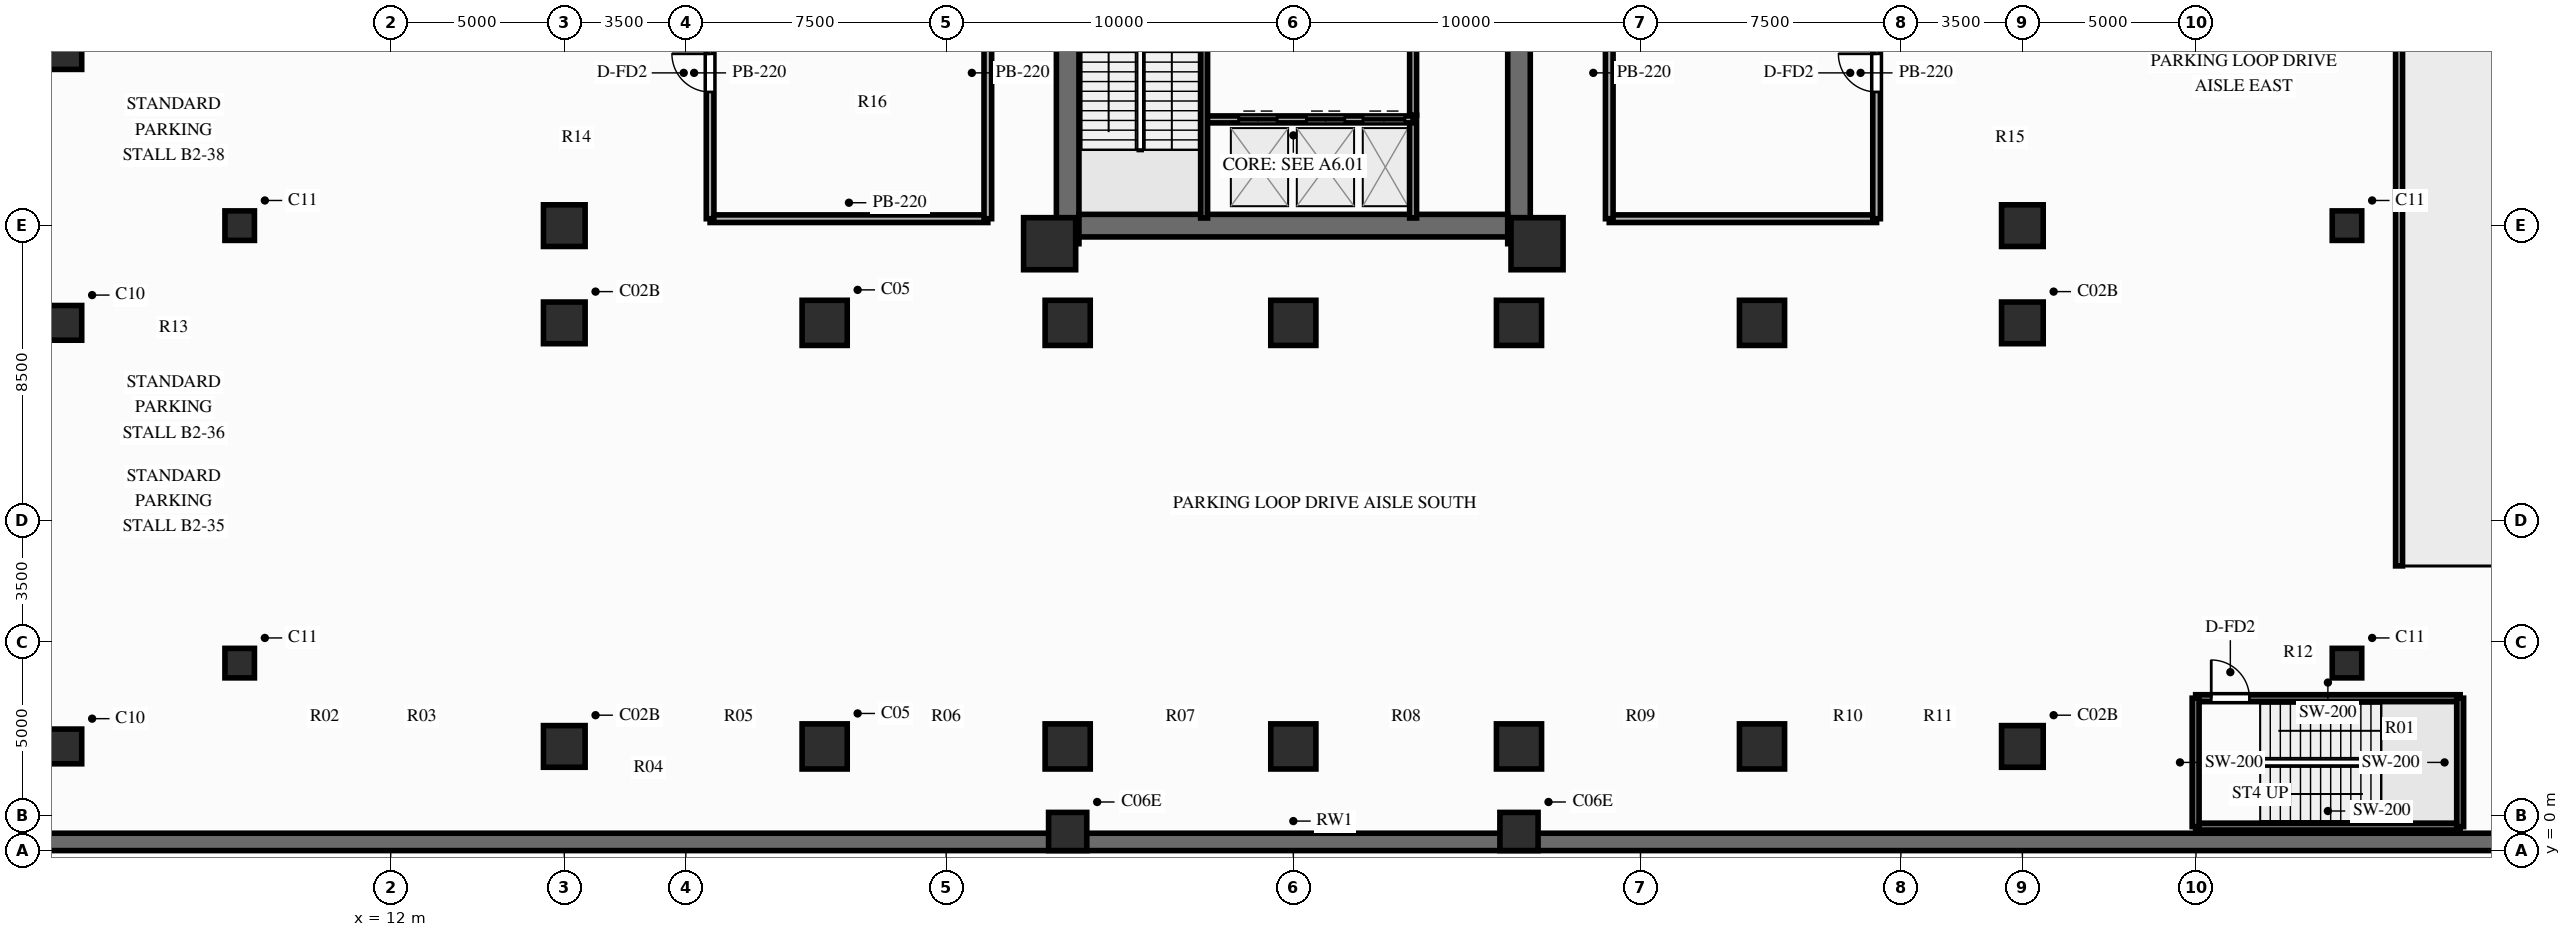
"""IFC4 building model, lengths in metres.
Left out: names, types, materials, properties, quantities, classifications, styles, units other than length and angle.
Written with IfcOpenShell. Run it as: python <this file> out.ifc"""

import sys

from ifc_helpers import new_model, si_unit, direction, frame, frame_2d, origin, origin_2d, place, context, subcontext, project, spatial, rectangle, circle, extrude, source, transform, mapped, element, fill, save


model = new_model("IFC4")
c1 = context("Model", 3, precision=1e-05, world=origin(), true_north=direction((0.0, 1.0)))
c2 = subcontext(c1, "Body", "Model", "MODEL_VIEW")
j1 = project(units=[si_unit("LENGTHUNIT", "METRE"), si_unit("PLANEANGLEUNIT", "RADIAN")], contexts=[c1])
p1 = place(None, origin())
s1 = spatial("IfcSite", under=j1, at=p1, CompositionType="ELEMENT")
p2 = place(p1, origin())
s2 = spatial("IfcBuilding", under=s1, at=p2, CompositionType="ELEMENT")
p3 = place(p2, frame((0.0, 0.0, -9.2)))
s3 = spatial("IfcBuildingStorey", under=s2, at=p3, CompositionType="ELEMENT", Elevation=-9.2)
p4 = place(p3, frame((0.25, 0.25, 0.0), z_axis=(0.0, 0.0, 1.0), x_axis=(1.0, 0.0, 0.0)))
e1 = element("IfcWall", 1, at=p4, inside=s3, PredefinedType="USERDEFINED", context=c2, shape_type="SweptSolid", body=[
    extrude(rectangle(XDim=75.5, YDim=0.5, at=frame_2d((37.75, 0.0))), origin(), (0.0, 0.0, 1.0), 4.6),
])
p5 = place(p3, frame((31.5, 17.48, 0.0), z_axis=(0.0, 0.0, 1.0), x_axis=(0.0, 1.0, 0.0)))
e2 = element("IfcWall", 2, at=p5, inside=s3, PredefinedType="SHEAR", context=c2, shape_type="SweptSolid", body=[
    extrude(rectangle(XDim=19.04, YDim=0.65, at=frame_2d((9.52, 0.0))), origin(), (0.0, 0.0, 1.0), 4.6),
])
p6 = place(p5, frame((6.32, 0.0, 0.0)))
e3 = element("IfcOpeningElement", 3, at=p6, cuts=e2, PredefinedType="OPENING", context=c2, shape_type="SweptSolid", body=[
    extrude(rectangle(XDim=1.1, YDim=2.15, at=frame_2d((0.55, 1.075))), frame((0.0, 0.337, 0.0), z_axis=(0.0, -1.0, 0.0), x_axis=(1.0, 0.0, 0.0)), (0.0, 0.0, 1.0), 0.674),
])
p7 = place(p3, frame((44.5, 17.48, 0.0), z_axis=(0.0, 0.0, 1.0), x_axis=(0.0, 1.0, 0.0)))
e4 = element("IfcWall", 4, at=p7, inside=s3, PredefinedType="SHEAR", context=c2, shape_type="SweptSolid", body=[
    extrude(rectangle(XDim=19.04, YDim=0.65, at=frame_2d((9.52, 0.0))), origin(), (0.0, 0.0, 1.0), 4.6),
])
p8 = place(p7, frame((12.67, 0.0, 0.0), z_axis=(0.0, 0.0, 1.0), x_axis=(-1.0, 0.0, 0.0)))
e5 = element("IfcOpeningElement", 5, at=p8, cuts=e4, PredefinedType="OPENING", context=c2, shape_type="SweptSolid", body=[
    extrude(rectangle(XDim=1.1, YDim=2.15, at=frame_2d((0.55, 1.075))), frame((0.0, 0.337, 0.0), z_axis=(0.0, -1.0, 0.0), x_axis=(1.0, 0.0, 0.0)), (0.0, 0.0, 1.0), 0.674),
])
p9 = place(p3, frame((31.825, 18.0, 0.0), z_axis=(0.0, 0.0, 1.0), x_axis=(1.0, 0.0, 0.0)))
e6 = element("IfcWall", 6, at=p9, inside=s3, PredefinedType="SHEAR", context=c2, shape_type="SweptSolid", body=[
    extrude(rectangle(XDim=12.35, YDim=0.65, at=frame_2d((6.175, 0.0))), origin(), (0.0, 0.0, 1.0), 4.6),
])
m1 = source(origin(), c2, "Body", "SweptSolid", [
    extrude(rectangle(XDim=1.5, YDim=1.5, at=origin_2d()), origin(), (0.0, 0.0, 1.0), 4.6),
])
for number, where, z_axis, x_axis in (
    (7, (30.98, 17.48, 0.0), (0.0, 0.0, 1.0), (1.0, 0.0, 0.0)),
    (8, (45.02, 17.48, 0.0), (0.0, 0.0, 1.0), (1.0, 0.0, 0.0)),
):
    element("IfcColumn", number, at=place(p3, frame(where, z_axis=z_axis, x_axis=x_axis)), inside=s3, PredefinedType="COLUMN", context=c2, shape_type="MappedRepresentation", body=[
        mapped(m1, transform((0.0, 0.0, 0.0), scale=1.0)),
    ])
m2 = source(origin(), c2, "Body", "SweptSolid", [
    extrude(circle(Radius=0.5, at=origin_2d()), origin(), (0.0, 0.0, 1.0), 4.6),
])
for number, where, z_axis, x_axis in (
    (9, (2.6, 3.0, 0.0), (0.0, 0.0, 1.0), (1.0, 0.0, 0.0)),
    (10, (2.6, 15.2, 0.0), (0.0, 0.0, 1.0), (1.0, 0.0, 0.0)),
    (11, (2.6, 23.0, 0.0), (0.0, 0.0, 1.0), (1.0, 0.0, 0.0)),
):
    element("IfcColumn", number, at=place(p3, frame(where, z_axis=z_axis, x_axis=x_axis)), inside=s3, PredefinedType="COLUMN", context=c2, shape_type="MappedRepresentation", body=[
        mapped(m2, transform((0.0, 0.0, 0.0), scale=1.0)),
    ])
m3 = source(origin(), c2, "Body", "SweptSolid", [
    extrude(circle(Radius=0.425, at=origin_2d()), origin(), (0.0, 0.0, 1.0), 4.6),
])
for number, where, z_axis, x_axis in (
    (12, (7.65, 5.4, 0.0), (0.0, 0.0, 1.0), (1.0, 0.0, 0.0)),
    (13, (68.35, 5.4, 0.0), (0.0, 0.0, 1.0), (1.0, 0.0, 0.0)),
    (14, (7.65, 18.0, 0.0), (0.0, 0.0, 1.0), (1.0, 0.0, 0.0)),
    (15, (68.35, 18.0, 0.0), (0.0, 0.0, 1.0), (1.0, 0.0, 0.0)),
):
    element("IfcColumn", number, at=place(p3, frame(where, z_axis=z_axis, x_axis=x_axis)), inside=s3, PredefinedType="COLUMN", context=c2, shape_type="MappedRepresentation", body=[
        mapped(m3, transform((0.0, 0.0, 0.0), scale=1.0)),
    ])
m4 = source(origin(), c2, "Body", "SweptSolid", [
    extrude(rectangle(XDim=1.2, YDim=1.2, at=origin_2d()), origin(), (0.0, 0.0, 1.0), 4.6),
])
for number, where, z_axis, x_axis in (
    (16, (17.0, 3.0, 0.0), (0.0, 0.0, 1.0), (1.0, 0.0, 0.0)),
    (17, (59.0, 3.0, 0.0), (0.0, 0.0, 1.0), (1.0, 0.0, 0.0)),
    (18, (17.0, 15.2, 0.0), (0.0, 0.0, 1.0), (1.0, 0.0, 0.0)),
    (19, (59.0, 15.2, 0.0), (0.0, 0.0, 1.0), (1.0, 0.0, 0.0)),
    (20, (17.0, 18.0, 0.0), (0.0, 0.0, 1.0), (1.0, 0.0, 0.0)),
    (21, (59.0, 18.0, 0.0), (0.0, 0.0, 1.0), (1.0, 0.0, 0.0)),
):
    element("IfcColumn", number, at=place(p3, frame(where, z_axis=z_axis, x_axis=x_axis)), inside=s3, PredefinedType="COLUMN", context=c2, shape_type="MappedRepresentation", body=[
        mapped(m4, transform((0.0, 0.0, 0.0), scale=1.0)),
    ])
m5 = source(origin(), c2, "Body", "SweptSolid", [
    extrude(rectangle(XDim=1.3, YDim=1.3, at=origin_2d()), origin(), (0.0, 0.0, 1.0), 4.6),
])
for number, where, z_axis, x_axis in (
    (22, (24.5, 3.0, 0.0), (0.0, 0.0, 1.0), (1.0, 0.0, 0.0)),
    (23, (24.5, 15.2, 0.0), (0.0, 0.0, 1.0), (1.0, 0.0, 0.0)),
):
    element("IfcColumn", number, at=place(p3, frame(where, z_axis=z_axis, x_axis=x_axis)), inside=s3, PredefinedType="COLUMN", context=c2, shape_type="MappedRepresentation", body=[
        mapped(m5, transform((0.0, 0.0, 0.0), scale=1.0)),
    ])
m6 = source(origin(), c2, "Body", "SweptSolid", [
    extrude(rectangle(XDim=1.1, YDim=1.1, at=origin_2d()), origin(), (0.0, 0.0, 1.0), 4.6),
])
p10 = place(p3, frame((31.5, 0.55, 0.0), z_axis=(0.0, 0.0, 1.0), x_axis=(1.0, 0.0, 0.0)))
e24 = element("IfcColumn", 24, at=p10, inside=s3, PredefinedType="COLUMN", context=c2, shape_type="MappedRepresentation", body=[
    mapped(m6, transform((0.0, 0.0, 0.0), scale=1.0)),
])
for number, where, z_axis, x_axis in (
    (25, (31.5, 3.0, 0.0), (0.0, 0.0, 1.0), (1.0, 0.0, 0.0)),
    (26, (31.5, 15.2, 0.0), (0.0, 0.0, 1.0), (1.0, 0.0, 0.0)),
    (27, (38.0, 3.0, 0.0), (0.0, 0.0, 1.0), (1.0, 0.0, 0.0)),
    (28, (38.0, 15.2, 0.0), (0.0, 0.0, 1.0), (1.0, 0.0, 0.0)),
):
    element("IfcColumn", number, at=place(p3, frame(where, z_axis=z_axis, x_axis=x_axis)), inside=s3, PredefinedType="COLUMN", context=c2, shape_type="MappedRepresentation", body=[
        mapped(m5, transform((0.0, 0.0, 0.0), scale=1.0)),
    ])
p11 = place(p3, frame((44.5, 0.55, 0.0), z_axis=(0.0, 0.0, 1.0), x_axis=(1.0, 0.0, 0.0)))
e29 = element("IfcColumn", 29, at=p11, inside=s3, PredefinedType="COLUMN", context=c2, shape_type="MappedRepresentation", body=[
    mapped(m6, transform((0.0, 0.0, 0.0), scale=1.0)),
])
for number, where, z_axis, x_axis in (
    (30, (44.5, 3.0, 0.0), (0.0, 0.0, 1.0), (1.0, 0.0, 0.0)),
    (31, (44.5, 15.2, 0.0), (0.0, 0.0, 1.0), (1.0, 0.0, 0.0)),
    (32, (51.5, 3.0, 0.0), (0.0, 0.0, 1.0), (1.0, 0.0, 0.0)),
    (33, (51.5, 15.2, 0.0), (0.0, 0.0, 1.0), (1.0, 0.0, 0.0)),
):
    element("IfcColumn", number, at=place(p3, frame(where, z_axis=z_axis, x_axis=x_axis)), inside=s3, PredefinedType="COLUMN", context=c2, shape_type="MappedRepresentation", body=[
        mapped(m5, transform((0.0, 0.0, 0.0), scale=1.0)),
    ])
p12 = place(p3, frame((41.45, 18.22, 0.0), z_axis=(0.0, 0.0, 1.0), x_axis=(0.0, 1.0, 0.0)))
e34 = element("IfcWall", 34, at=p12, inside=s3, PredefinedType="PARTITIONING", context=c2, shape_type="SweptSolid", body=[
    extrude(rectangle(XDim=2.96, YDim=0.2, at=frame_2d((1.48, 0.0))), origin(), (0.0, 0.0, 1.0), 4.3),
])
p13 = place(p3, frame((41.45, 21.18, 0.0), z_axis=(0.0, 0.0, 1.0), x_axis=(0.0, 1.0, 0.0)))
e35 = element("IfcWall", 35, at=p13, inside=s3, PredefinedType="PARTITIONING", context=c2, shape_type="SweptSolid", body=[
    extrude(rectangle(XDim=7.42, YDim=0.2, at=frame_2d((3.71, 0.0))), origin(), (0.0, 0.0, 1.0), 4.3),
])
p14 = place(p13, frame((2.6, 0.0, 0.0)))
e36 = element("IfcOpeningElement", 36, at=p14, cuts=e35, PredefinedType="OPENING", context=c2, shape_type="SweptSolid", body=[
    extrude(rectangle(XDim=0.9, YDim=2.1, at=frame_2d((0.45, 1.05))), frame((0.0, 0.112, 0.0), z_axis=(0.0, -1.0, 0.0), x_axis=(1.0, 0.0, 0.0)), (0.0, 0.0, 1.0), 0.224),
])
p15 = place(p3, frame((35.43, 21.06, 0.0), z_axis=(0.0, 0.0, 1.0), x_axis=(1.0, 0.0, 0.0)))
e37 = element("IfcWall", 37, at=p15, inside=s3, PredefinedType="PARTITIONING", context=c2, shape_type="SweptSolid", body=[
    extrude(rectangle(XDim=6.02, YDim=0.2, at=frame_2d((3.01, 0.0))), origin(), (0.0, 0.0, 1.0), 4.3),
])
p16 = place(p15, frame((1.0, 0.0, 0.0)))
e38 = element("IfcOpeningElement", 38, at=p16, cuts=e37, PredefinedType="OPENING", context=c2, shape_type="SweptSolid", body=[
    extrude(rectangle(XDim=1.1, YDim=2.15, at=frame_2d((0.55, 1.075))), frame((0.0, 0.112, 0.0), z_axis=(0.0, -1.0, 0.0), x_axis=(1.0, 0.0, 0.0)), (0.0, 0.0, 1.0), 0.224),
])
p17 = place(p15, frame((2.95, 0.0, 0.0)))
e39 = element("IfcOpeningElement", 39, at=p17, cuts=e37, PredefinedType="OPENING", context=c2, shape_type="SweptSolid", body=[
    extrude(rectangle(XDim=1.1, YDim=2.15, at=frame_2d((0.55, 1.075))), frame((0.0, 0.112, 0.0), z_axis=(0.0, -1.0, 0.0), x_axis=(1.0, 0.0, 0.0)), (0.0, 0.0, 1.0), 0.224),
])
p18 = place(p15, frame((4.58, 0.0, 0.0)))
e40 = element("IfcOpeningElement", 40, at=p18, cuts=e37, PredefinedType="OPENING", context=c2, shape_type="SweptSolid", body=[
    extrude(rectangle(XDim=1.2, YDim=2.15, at=frame_2d((0.6, 1.075))), frame((0.0, 0.112, 0.0), z_axis=(0.0, -1.0, 0.0), x_axis=(1.0, 0.0, 0.0)), (0.0, 0.0, 1.0), 0.224),
])
p19 = place(p3, frame((35.43, 18.22, 0.0), z_axis=(0.0, 0.0, 1.0), x_axis=(0.0, 1.0, 0.0)))
e41 = element("IfcWall", 41, at=p19, inside=s3, PredefinedType="SOLIDWALL", context=c2, shape_type="SweptSolid", body=[
    extrude(rectangle(XDim=7.22, YDim=0.2, at=frame_2d((3.61, 0.0))), origin(), (0.0, 0.0, 1.0), 4.3),
])
p20 = place(p19, frame((6.68, 0.0, 0.0), z_axis=(0.0, 0.0, 1.0), x_axis=(-1.0, 0.0, 0.0)))
e42 = element("IfcOpeningElement", 42, at=p20, cuts=e41, PredefinedType="OPENING", context=c2, shape_type="SweptSolid", body=[
    extrude(rectangle(XDim=1.1, YDim=2.15, at=frame_2d((0.55, 1.075))), frame((0.0, 0.112, 0.0), z_axis=(0.0, -1.0, 0.0), x_axis=(1.0, 0.0, 0.0)), (0.0, 0.0, 1.0), 0.224),
])
p21 = place(p3, frame((63.99, 0.69, 0.0), z_axis=(0.0, 0.0, 1.0), x_axis=(1.0, 0.0, 0.0)))
e43 = element("IfcWall", 43, at=p21, inside=s3, PredefinedType="SOLIDWALL", context=c2, shape_type="SweptSolid", body=[
    extrude(rectangle(XDim=7.62, YDim=0.2, at=frame_2d((3.81, 0.0))), origin(), (0.0, 0.0, 1.0), 4.3),
])
p22 = place(p3, frame((63.99, 4.39, 0.0), z_axis=(0.0, 0.0, 1.0), x_axis=(1.0, 0.0, 0.0)))
e44 = element("IfcWall", 44, at=p22, inside=s3, PredefinedType="SOLIDWALL", context=c2, shape_type="SweptSolid", body=[
    extrude(rectangle(XDim=7.62, YDim=0.2, at=frame_2d((3.81, 0.0))), origin(), (0.0, 0.0, 1.0), 4.3),
])
p23 = place(p22, frame((0.45, 0.0, 0.0)))
e45 = element("IfcOpeningElement", 45, at=p23, cuts=e44, PredefinedType="OPENING", context=c2, shape_type="SweptSolid", body=[
    extrude(rectangle(XDim=1.1, YDim=2.15, at=frame_2d((0.55, 1.075))), frame((0.0, 0.112, 0.0), z_axis=(0.0, -1.0, 0.0), x_axis=(1.0, 0.0, 0.0)), (0.0, 0.0, 1.0), 0.224),
])
for number, where, z_axis, x_axis in (
    (46, (63.99, 0.69, 0.0), (0.0, 0.0, 1.0), (0.0, 1.0, 0.0)),
    (47, (71.61, 0.69, 0.0), (0.0, 0.0, 1.0), (0.0, 1.0, 0.0)),
):
    element("IfcWall", number, at=place(p3, frame(where, z_axis=z_axis, x_axis=x_axis)), inside=s3, PredefinedType="SOLIDWALL", context=c2, shape_type="SweptSolid", body=[
        extrude(rectangle(XDim=3.7, YDim=0.2, at=frame_2d((1.85, 0.0))), origin(), (0.0, 0.0, 1.0), 4.3),
    ])
p24 = place(p3, frame((69.85, 8.2, 0.0), z_axis=(0.0, 0.0, 1.0), x_axis=(0.0, 1.0, 0.0)))
e48 = element("IfcWall", 48, at=p24, inside=s3, PredefinedType="PARTITIONING", context=c2, shape_type="SweptSolid", body=[
    extrude(rectangle(XDim=31.6, YDim=0.2, at=frame_2d((15.8, 0.0))), origin(), (0.0, 0.0, 1.0), 4.3),
])
p25 = place(p3, frame((21.2, 18.2, 0.0), z_axis=(0.0, 0.0, 1.0), x_axis=(1.0, 0.0, 0.0)))
e49 = element("IfcWall", 49, at=p25, inside=s3, PredefinedType="PARTITIONING", context=c2, shape_type="SweptSolid", body=[
    extrude(rectangle(XDim=8.0, YDim=0.22, at=frame_2d((4.0, 0.0))), origin(), (0.0, 0.0, 1.0), 4.3),
])
p26 = place(p3, frame((21.2, 18.2, 0.0), z_axis=(0.0, 0.0, 1.0), x_axis=(0.0, 1.0, 0.0)))
e50 = element("IfcWall", 50, at=p26, inside=s3, PredefinedType="PARTITIONING", context=c2, shape_type="SweptSolid", body=[
    extrude(rectangle(XDim=8.4, YDim=0.22, at=frame_2d((4.2, 0.0))), origin(), (0.0, 0.0, 1.0), 4.3),
])
p27 = place(p26, frame((3.65, 0.0, 0.0)))
e51 = element("IfcOpeningElement", 51, at=p27, cuts=e50, PredefinedType="OPENING", context=c2, shape_type="SweptSolid", body=[
    extrude(rectangle(XDim=1.1, YDim=2.15, at=frame_2d((0.55, 1.075))), frame((0.0, 0.122, 0.0), z_axis=(0.0, -1.0, 0.0), x_axis=(1.0, 0.0, 0.0)), (0.0, 0.0, 1.0), 0.244),
])
p28 = place(p3, frame((29.2, 18.2, 0.0), z_axis=(0.0, 0.0, 1.0), x_axis=(0.0, 1.0, 0.0)))
e52 = element("IfcWall", 52, at=p28, inside=s3, PredefinedType="PARTITIONING", context=c2, shape_type="SweptSolid", body=[
    extrude(rectangle(XDim=8.4, YDim=0.22, at=frame_2d((4.2, 0.0))), origin(), (0.0, 0.0, 1.0), 4.3),
])
p29 = place(p3, frame((47.1, 18.2, 0.0), z_axis=(0.0, 0.0, 1.0), x_axis=(1.0, 0.0, 0.0)))
e53 = element("IfcWall", 53, at=p29, inside=s3, PredefinedType="PARTITIONING", context=c2, shape_type="SweptSolid", body=[
    extrude(rectangle(XDim=7.7, YDim=0.22, at=frame_2d((3.85, 0.0))), origin(), (0.0, 0.0, 1.0), 4.3),
])
p30 = place(p3, frame((47.1, 18.2, 0.0), z_axis=(0.0, 0.0, 1.0), x_axis=(0.0, 1.0, 0.0)))
e54 = element("IfcWall", 54, at=p30, inside=s3, PredefinedType="PARTITIONING", context=c2, shape_type="SweptSolid", body=[
    extrude(rectangle(XDim=8.4, YDim=0.22, at=frame_2d((4.2, 0.0))), origin(), (0.0, 0.0, 1.0), 4.3),
])
p31 = place(p3, frame((54.8, 18.2, 0.0), z_axis=(0.0, 0.0, 1.0), x_axis=(0.0, 1.0, 0.0)))
e55 = element("IfcWall", 55, at=p31, inside=s3, PredefinedType="PARTITIONING", context=c2, shape_type="SweptSolid", body=[
    extrude(rectangle(XDim=8.4, YDim=0.22, at=frame_2d((4.2, 0.0))), origin(), (0.0, 0.0, 1.0), 4.3),
])
p32 = place(p31, frame((3.65, 0.0, 0.0)))
e56 = element("IfcOpeningElement", 56, at=p32, cuts=e55, PredefinedType="OPENING", context=c2, shape_type="SweptSolid", body=[
    extrude(rectangle(XDim=1.1, YDim=2.15, at=frame_2d((0.55, 1.075))), frame((0.0, 0.122, 0.0), z_axis=(0.0, -1.0, 0.0), x_axis=(1.0, 0.0, 0.0)), (0.0, 0.0, 1.0), 0.244),
])
m7 = source(origin(), c2, "Body", "SweptSolid", [
    extrude(rectangle(XDim=1.1, YDim=2.15, at=frame_2d((0.55, 1.075))), frame((0.0, 0.025, 0.0), z_axis=(0.0, -1.0, 0.0), x_axis=(1.0, 0.0, 0.0)), (0.0, 0.0, 1.0), 0.05),
])
p33 = place(p16, origin())
e57 = element("IfcDoor", 57, at=p33, inside=s3, OperationType="DOUBLE_DOOR_SLIDING", PredefinedType="DOOR", context=c2, shape_type="MappedRepresentation", body=[
    mapped(m7, transform((0.0, 0.0, 0.0), scale=1.0)),
])
fill(e38, e57)
p34 = place(p17, origin())
e58 = element("IfcDoor", 58, at=p34, inside=s3, OperationType="DOUBLE_DOOR_SLIDING", PredefinedType="DOOR", context=c2, shape_type="MappedRepresentation", body=[
    mapped(m7, transform((0.0, 0.0, 0.0), scale=1.0)),
])
fill(e39, e58)
m8 = source(origin(), c2, "Body", "SweptSolid", [
    extrude(rectangle(XDim=1.2, YDim=2.15, at=frame_2d((0.6, 1.075))), frame((0.0, 0.025, 0.0), z_axis=(0.0, -1.0, 0.0), x_axis=(1.0, 0.0, 0.0)), (0.0, 0.0, 1.0), 0.05),
])
p35 = place(p18, origin())
e59 = element("IfcDoor", 59, at=p35, inside=s3, OperationType="DOUBLE_DOOR_SLIDING", PredefinedType="DOOR", context=c2, shape_type="MappedRepresentation", body=[
    mapped(m8, transform((0.0, 0.0, 0.0), scale=1.0)),
])
fill(e40, e59)
p36 = place(p23, origin())
e60 = element("IfcDoor", 60, at=p36, inside=s3, OperationType="SINGLE_SWING_LEFT", PredefinedType="DOOR", context=c2, shape_type="MappedRepresentation", body=[
    mapped(m7, transform((0.0, 0.0, 0.0), scale=1.0)),
])
fill(e45, e60)
p37 = place(p27, origin())
e61 = element("IfcDoor", 61, at=p37, inside=s3, OperationType="SINGLE_SWING_RIGHT", PredefinedType="DOOR", context=c2, shape_type="MappedRepresentation", body=[
    mapped(m7, transform((0.0, 0.0, 0.0), scale=1.0)),
])
fill(e51, e61)
p38 = place(p32, origin())
e62 = element("IfcDoor", 62, at=p38, inside=s3, OperationType="SINGLE_SWING_RIGHT", PredefinedType="DOOR", context=c2, shape_type="MappedRepresentation", body=[
    mapped(m7, transform((0.0, 0.0, 0.0), scale=1.0)),
])
fill(e56, e62)
save(model, sys.argv[1])
